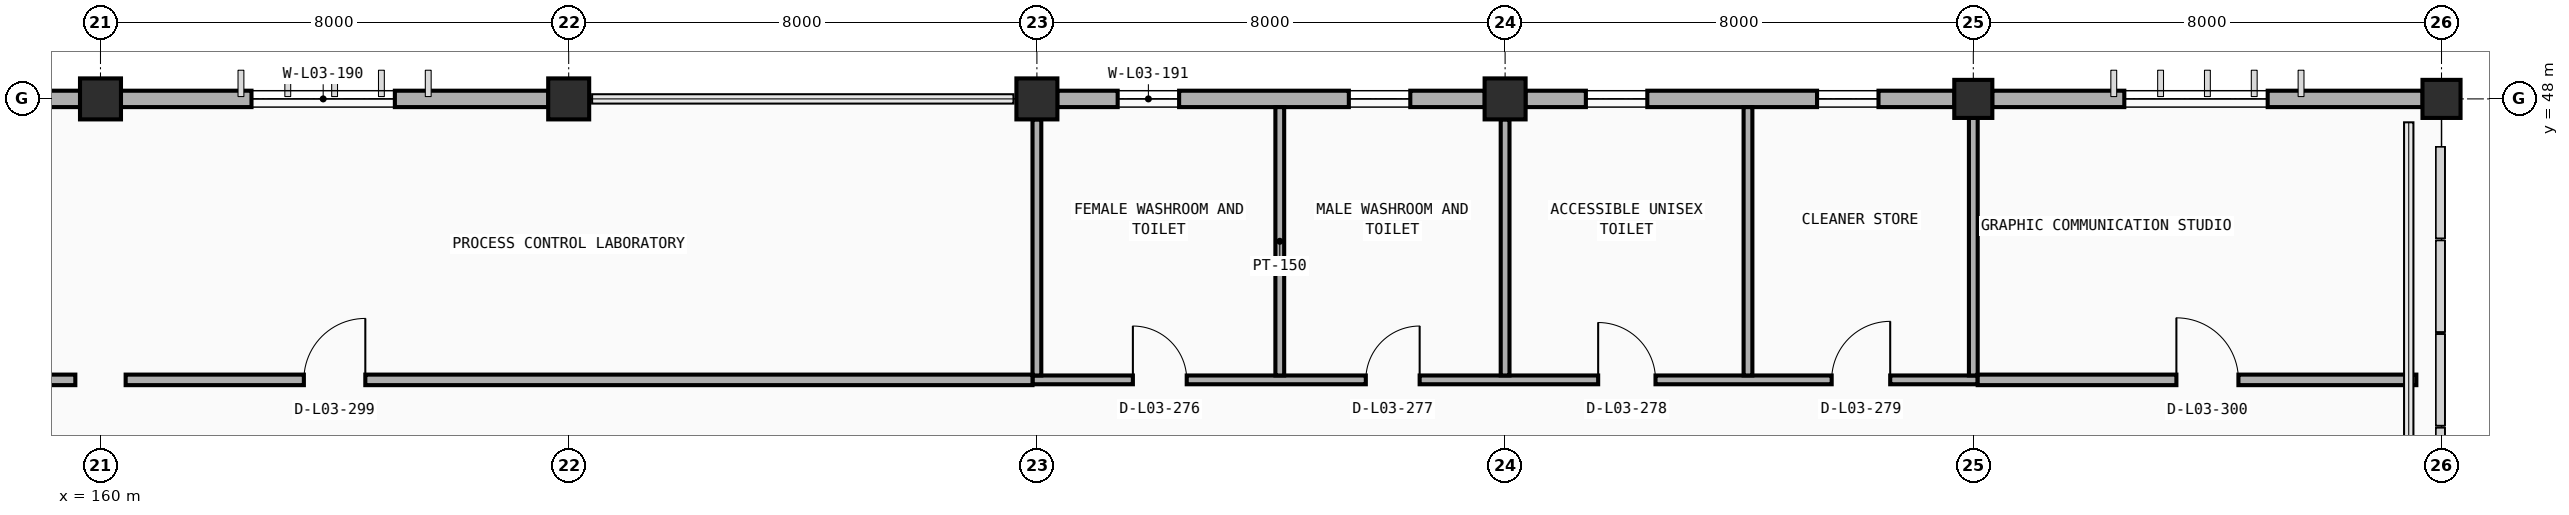
"""IFC4 building model, lengths in metres.
Left out: names, types, materials, properties, quantities, classifications, styles, units other than length and angle.
Written with IfcOpenShell. Run it as: python <this file> out.ifc"""

import sys

from ifc_helpers import new_model, si_unit, direction, frame, frame_2d, origin, origin_2d, place, context, subcontext, project, spatial, rectangle, extrude, element, fill, save


model = new_model("IFC4")
c1 = context("Model", 3, precision=1e-05, world=origin(), true_north=direction((0.0, 1.0)))
c2 = subcontext(c1, "Body", "Model", "MODEL_VIEW")
j1 = project(units=[si_unit("LENGTHUNIT", "METRE"), si_unit("PLANEANGLEUNIT", "RADIAN")], contexts=[c1])
p1 = place(None, origin())
s1 = spatial("IfcSite", under=j1, at=p1, CompositionType="ELEMENT")
p2 = place(p1, origin())
s2 = spatial("IfcBuilding", under=s1, at=p2, CompositionType="ELEMENT")
p3 = place(p2, frame((0.0, 0.0, 9.6)))
s3 = spatial("IfcBuildingStorey", under=s2, at=p3, CompositionType="ELEMENT", Elevation=9.6)
for number, where, z_axis, x_axis in (
    (1, (160.0, 48.0, 0.0), (0.0, 0.0, 1.0), (1.0, 0.0, 0.0)),
    (2, (168.0, 48.0, 0.0), (0.0, 0.0, 1.0), (1.0, 0.0, 0.0)),
    (3, (176.0, 48.0, 0.0), (0.0, 0.0, 1.0), (1.0, 0.0, 0.0)),
    (4, (184.0, 48.0, 0.0), (0.0, 0.0, 1.0), (1.0, 0.0, 0.0)),
):
    element("IfcColumn", number, at=place(p3, frame(where, z_axis=z_axis, x_axis=x_axis)), inside=s3, PredefinedType="COLUMN", context=c2, shape_type="SweptSolid", body=[
        extrude(rectangle(XDim=0.7, YDim=0.7, at=origin_2d()), origin(), (0.0, 0.0, 1.0), 4.2),
    ])
for number, where, z_axis, x_axis in (
    (5, (192.0, 48.0, 0.0), (0.0, 0.0, 1.0), (1.0, 0.0, 0.0)),
    (6, (200.0, 48.0, 0.0), (0.0, 0.0, 1.0), (1.0, 0.0, 0.0)),
):
    element("IfcColumn", number, at=place(p3, frame(where, z_axis=z_axis, x_axis=x_axis)), inside=s3, PredefinedType="COLUMN", context=c2, shape_type="SweptSolid", body=[
        extrude(rectangle(XDim=0.65, YDim=0.65, at=origin_2d()), origin(), (0.0, 0.0, 1.0), 4.2),
    ])
p4 = place(p3, frame((152.347, 48.0, 0.0), z_axis=(0.0, 0.0, 1.0), x_axis=(1.0, 0.0, 0.0)))
e7 = element("IfcWall", 7, at=p4, inside=s3, PredefinedType="STANDARD", context=c2, shape_type="SweptSolid", body=[
    extrude(rectangle(XDim=7.306, YDim=0.28, at=frame_2d((3.653, 0.0))), origin(), (0.0, 0.0, 1.0), 3.325),
])
p5 = place(p4, frame((2.233, 0.0, 0.9)))
e8 = element("IfcOpeningElement", 8, at=p5, cuts=e7, PredefinedType="OPENING", context=c2, shape_type="SweptSolid", body=[
    extrude(rectangle(XDim=1.05, YDim=1.85, at=frame_2d((0.525, 0.925))), frame((0.0, 0.15, 0.0), z_axis=(0.0, -1.0, 0.0), x_axis=(1.0, 0.0, 0.0)), (0.0, 0.0, 1.0), 0.3),
])
p6 = place(p3, frame((160.347, 48.0, 0.0), z_axis=(0.0, 0.0, 1.0), x_axis=(1.0, 0.0, 0.0)))
e9 = element("IfcWall", 9, at=p6, inside=s3, PredefinedType="STANDARD", context=c2, shape_type="SweptSolid", body=[
    extrude(rectangle(XDim=7.306, YDim=0.28, at=frame_2d((3.653, 0.0))), origin(), (0.0, 0.0, 1.0), 3.325),
])
p7 = place(p6, frame((2.233, 0.0, 0.9)))
e10 = element("IfcOpeningElement", 10, at=p7, cuts=e9, PredefinedType="OPENING", context=c2, shape_type="SweptSolid", body=[
    extrude(rectangle(XDim=2.45, YDim=1.7, at=frame_2d((1.225, 0.85))), frame((0.0, 0.15, 0.0), z_axis=(0.0, -1.0, 0.0), x_axis=(1.0, 0.0, 0.0)), (0.0, 0.0, 1.0), 0.3),
])
p8 = place(p3, frame((176.347, 48.0, 0.0), z_axis=(0.0, 0.0, 1.0), x_axis=(1.0, 0.0, 0.0)))
e11 = element("IfcWall", 11, at=p8, inside=s3, PredefinedType="STANDARD", context=c2, shape_type="SweptSolid", body=[
    extrude(rectangle(XDim=7.306, YDim=0.28, at=frame_2d((3.653, 0.0))), origin(), (0.0, 0.0, 1.0), 3.325),
])
p9 = place(p8, frame((1.033, 0.0, 1.15)))
e12 = element("IfcOpeningElement", 12, at=p9, cuts=e11, PredefinedType="OPENING", context=c2, shape_type="SweptSolid", body=[
    extrude(rectangle(XDim=1.05, YDim=1.25, at=frame_2d((0.525, 0.625))), frame((0.0, 0.15, 0.0), z_axis=(0.0, -1.0, 0.0), x_axis=(1.0, 0.0, 0.0)), (0.0, 0.0, 1.0), 0.3),
])
p10 = place(p8, frame((4.983, 0.0, 1.15)))
e13 = element("IfcOpeningElement", 13, at=p10, cuts=e11, PredefinedType="OPENING", context=c2, shape_type="SweptSolid", body=[
    extrude(rectangle(XDim=1.05, YDim=1.25, at=frame_2d((0.525, 0.625))), frame((0.0, 0.15, 0.0), z_axis=(0.0, -1.0, 0.0), x_axis=(1.0, 0.0, 0.0)), (0.0, 0.0, 1.0), 0.3),
])
p11 = place(p3, frame((184.347, 48.0, 0.0), z_axis=(0.0, 0.0, 1.0), x_axis=(1.0, 0.0, 0.0)))
e14 = element("IfcWall", 14, at=p11, inside=s3, PredefinedType="STANDARD", context=c2, shape_type="SweptSolid", body=[
    extrude(rectangle(XDim=7.331, YDim=0.28, at=frame_2d((3.666, 0.0))), origin(), (0.0, 0.0, 1.0), 3.325),
])
p12 = place(p11, frame((1.033, 0.0, 1.15)))
e15 = element("IfcOpeningElement", 15, at=p12, cuts=e14, PredefinedType="OPENING", context=c2, shape_type="SweptSolid", body=[
    extrude(rectangle(XDim=1.05, YDim=1.25, at=frame_2d((0.525, 0.625))), frame((0.0, 0.15, 0.0), z_axis=(0.0, -1.0, 0.0), x_axis=(1.0, 0.0, 0.0)), (0.0, 0.0, 1.0), 0.3),
])
p13 = place(p11, frame((4.983, 0.0, 1.15)))
e16 = element("IfcOpeningElement", 16, at=p13, cuts=e14, PredefinedType="OPENING", context=c2, shape_type="SweptSolid", body=[
    extrude(rectangle(XDim=1.05, YDim=1.25, at=frame_2d((0.525, 0.625))), frame((0.0, 0.15, 0.0), z_axis=(0.0, -1.0, 0.0), x_axis=(1.0, 0.0, 0.0)), (0.0, 0.0, 1.0), 0.3),
])
p14 = place(p3, frame((192.322, 48.0, 0.0), z_axis=(0.0, 0.0, 1.0), x_axis=(1.0, 0.0, 0.0)))
e17 = element("IfcWall", 17, at=p14, inside=s3, PredefinedType="STANDARD", context=c2, shape_type="SweptSolid", body=[
    extrude(rectangle(XDim=7.356, YDim=0.28, at=frame_2d((3.678, 0.0))), origin(), (0.0, 0.0, 1.0), 3.325),
])
p15 = place(p14, frame((2.258, 0.0, 0.9)))
e18 = element("IfcOpeningElement", 18, at=p15, cuts=e17, PredefinedType="OPENING", context=c2, shape_type="SweptSolid", body=[
    extrude(rectangle(XDim=2.45, YDim=1.7, at=frame_2d((1.225, 0.85))), frame((0.0, 0.15, 0.0), z_axis=(0.0, -1.0, 0.0), x_axis=(1.0, 0.0, 0.0)), (0.0, 0.0, 1.0), 0.3),
])
p16 = place(p3, frame((199.76, 47.78, 0.0), z_axis=(0.0, 0.0, 1.0), x_axis=(-1.0, 0.0, 0.0)))
e19 = element("IfcWall", 19, at=p16, inside=s3, PredefinedType="PARAPET", context=c2, shape_type="SweptSolid", body=[
    extrude(rectangle(XDim=0.32, YDim=0.2, at=frame_2d((0.16, 0.0))), origin(), (0.0, 0.0, 1.0), 3.35),
])
p17 = place(p3, frame((175.925, 43.2, 0.0), z_axis=(0.0, 0.0, 1.0), x_axis=(1.0, 0.0, 0.0)))
e20 = element("IfcWall", 20, at=p17, inside=s3, PredefinedType="PARTITIONING", context=c2, shape_type="SweptSolid", body=[
    extrude(rectangle(XDim=16.15, YDim=0.15, at=frame_2d((8.075, 0.0))), origin(), (0.0, 0.0, 1.0), 3.3),
])
p18 = place(p17, frame((1.715, 0.0, 0.0)))
e21 = element("IfcOpeningElement", 21, at=p18, cuts=e20, PredefinedType="OPENING", context=c2, shape_type="SweptSolid", body=[
    extrude(rectangle(XDim=0.92, YDim=2.12, at=frame_2d((0.46, 1.06))), frame((0.0, 0.085, 0.0), z_axis=(0.0, -1.0, 0.0), x_axis=(1.0, 0.0, 0.0)), (0.0, 0.0, 1.0), 0.17),
])
p19 = place(p17, frame((5.695, 0.0, 0.0)))
e22 = element("IfcOpeningElement", 22, at=p19, cuts=e20, PredefinedType="OPENING", context=c2, shape_type="SweptSolid", body=[
    extrude(rectangle(XDim=0.92, YDim=2.12, at=frame_2d((0.46, 1.06))), frame((0.0, 0.085, 0.0), z_axis=(0.0, -1.0, 0.0), x_axis=(1.0, 0.0, 0.0)), (0.0, 0.0, 1.0), 0.17),
])
p20 = place(p17, frame((9.665, 0.0, 0.0)))
e23 = element("IfcOpeningElement", 23, at=p20, cuts=e20, PredefinedType="OPENING", context=c2, shape_type="SweptSolid", body=[
    extrude(rectangle(XDim=0.98, YDim=2.12, at=frame_2d((0.49, 1.06))), frame((0.0, 0.085, 0.0), z_axis=(0.0, -1.0, 0.0), x_axis=(1.0, 0.0, 0.0)), (0.0, 0.0, 1.0), 0.17),
])
p21 = place(p17, frame((13.655, 0.0, 0.0)))
e24 = element("IfcOpeningElement", 24, at=p21, cuts=e20, PredefinedType="OPENING", context=c2, shape_type="SweptSolid", body=[
    extrude(rectangle(XDim=1.0, YDim=2.15, at=frame_2d((0.5, 1.075))), frame((0.0, 0.085, 0.0), z_axis=(0.0, -1.0, 0.0), x_axis=(1.0, 0.0, 0.0)), (0.0, 0.0, 1.0), 0.17),
])
p22 = place(p3, frame((176.0, 43.275, 0.0), z_axis=(0.0, 0.0, 1.0), x_axis=(0.0, 1.0, 0.0)))
e25 = element("IfcWall", 25, at=p22, inside=s3, PredefinedType="PARTITIONING", context=c2, shape_type="SweptSolid", body=[
    extrude(rectangle(XDim=4.375, YDim=0.15, at=frame_2d((2.188, 0.0))), origin(), (0.0, 0.0, 1.0), 3.225),
])
p23 = place(p3, frame((180.15, 43.275, 0.0), z_axis=(0.0, 0.0, 1.0), x_axis=(0.0, 1.0, 0.0)))
e26 = element("IfcWall", 26, at=p23, inside=s3, PredefinedType="PARTITIONING", context=c2, shape_type="SweptSolid", body=[
    extrude(rectangle(XDim=4.585, YDim=0.15, at=frame_2d((2.292, 0.0))), origin(), (0.0, 0.0, 1.0), 3.3),
])
p24 = place(p3, frame((184.0, 43.275, 0.0), z_axis=(0.0, 0.0, 1.0), x_axis=(0.0, 1.0, 0.0)))
e27 = element("IfcWall", 27, at=p24, inside=s3, PredefinedType="PARTITIONING", context=c2, shape_type="SweptSolid", body=[
    extrude(rectangle(XDim=4.375, YDim=0.15, at=frame_2d((2.188, 0.0))), origin(), (0.0, 0.0, 1.0), 3.225),
])
p25 = place(p3, frame((188.15, 43.275, 0.0), z_axis=(0.0, 0.0, 1.0), x_axis=(0.0, 1.0, 0.0)))
e28 = element("IfcWall", 28, at=p25, inside=s3, PredefinedType="PARTITIONING", context=c2, shape_type="SweptSolid", body=[
    extrude(rectangle(XDim=4.585, YDim=0.15, at=frame_2d((2.292, 0.0))), origin(), (0.0, 0.0, 1.0), 3.3),
])
p26 = place(p3, frame((192.0, 43.275, 0.0), z_axis=(0.0, 0.0, 1.0), x_axis=(0.0, 1.0, 0.0)))
e29 = element("IfcWall", 29, at=p26, inside=s3, PredefinedType="PARTITIONING", context=c2, shape_type="SweptSolid", body=[
    extrude(rectangle(XDim=4.4, YDim=0.15, at=frame_2d((2.2, 0.0))), origin(), (0.0, 0.0, 1.0), 3.225),
])
p27 = place(p3, frame((128.43, 43.2, 0.0), z_axis=(0.0, 0.0, 1.0), x_axis=(1.0, 0.0, 0.0)))
e30 = element("IfcWall", 30, at=p27, inside=s3, PredefinedType="PARTITIONING", context=c2, shape_type="SweptSolid", body=[
    extrude(rectangle(XDim=31.14, YDim=0.18, at=frame_2d((15.57, 0.0))), origin(), (0.0, 0.0, 1.0), 3.3),
])
p28 = place(p27, frame((3.08, 0.0, 0.0)))
e31 = element("IfcOpeningElement", 31, at=p28, cuts=e30, PredefinedType="OPENING", context=c2, shape_type="SweptSolid", body=[
    extrude(rectangle(XDim=0.98, YDim=2.1, at=frame_2d((0.49, 1.05))), frame((0.0, 0.1, 0.0), z_axis=(0.0, -1.0, 0.0), x_axis=(1.0, 0.0, 0.0)), (0.0, 0.0, 1.0), 0.2),
])
p29 = place(p3, frame((160.43, 43.2, 0.0), z_axis=(0.0, 0.0, 1.0), x_axis=(1.0, 0.0, 0.0)))
e32 = element("IfcWall", 32, at=p29, inside=s3, PredefinedType="PARTITIONING", context=c2, shape_type="SweptSolid", body=[
    extrude(rectangle(XDim=15.495, YDim=0.18, at=frame_2d((7.748, 0.0))), origin(), (0.0, 0.0, 1.0), 3.3),
])
p30 = place(p29, frame((3.045, 0.0, 0.0)))
e33 = element("IfcOpeningElement", 33, at=p30, cuts=e32, PredefinedType="OPENING", context=c2, shape_type="SweptSolid", body=[
    extrude(rectangle(XDim=1.05, YDim=2.15, at=frame_2d((0.525, 1.075))), frame((0.0, 0.1, 0.0), z_axis=(0.0, -1.0, 0.0), x_axis=(1.0, 0.0, 0.0)), (0.0, 0.0, 1.0), 0.2),
])
p31 = place(p3, frame((192.075, 43.2, 0.0), z_axis=(0.0, 0.0, 1.0), x_axis=(1.0, 0.0, 0.0)))
e34 = element("IfcWall", 34, at=p31, inside=s3, PredefinedType="PARTITIONING", context=c2, shape_type="SweptSolid", body=[
    extrude(rectangle(XDim=7.495, YDim=0.18, at=frame_2d((3.748, 0.0))), origin(), (0.0, 0.0, 1.0), 3.3),
])
p32 = place(p31, frame((3.395, 0.0, 0.0)))
e35 = element("IfcOpeningElement", 35, at=p32, cuts=e34, PredefinedType="OPENING", context=c2, shape_type="SweptSolid", body=[
    extrude(rectangle(XDim=1.06, YDim=2.1, at=frame_2d((0.53, 1.05))), frame((0.0, 0.1, 0.0), z_axis=(0.0, -1.0, 0.0), x_axis=(1.0, 0.0, 0.0)), (0.0, 0.0, 1.0), 0.2),
])
p33 = place(p7, origin())
e36 = element("IfcWindow", 36, at=p33, inside=s3, PartitioningType="DOUBLE_PANEL_VERTICAL", PredefinedType="WINDOW", context=c2, shape_type="SweptSolid", body=[
    extrude(rectangle(XDim=2.45, YDim=1.7, at=frame_2d((1.225, 0.85))), frame((0.0, 0.03, 0.0), z_axis=(0.0, -1.0, 0.0), x_axis=(1.0, 0.0, 0.0)), (0.0, 0.0, 1.0), 0.06),
])
fill(e10, e36)
p34 = place(p9, origin())
e37 = element("IfcWindow", 37, at=p34, inside=s3, PartitioningType="SINGLE_PANEL", PredefinedType="WINDOW", context=c2, shape_type="SweptSolid", body=[
    extrude(rectangle(XDim=1.05, YDim=1.25, at=frame_2d((0.525, 0.625))), frame((0.0, 0.03, 0.0), z_axis=(0.0, -1.0, 0.0), x_axis=(1.0, 0.0, 0.0)), (0.0, 0.0, 1.0), 0.06),
])
fill(e12, e37)
p35 = place(p10, origin())
e38 = element("IfcWindow", 38, at=p35, inside=s3, PartitioningType="SINGLE_PANEL", PredefinedType="WINDOW", context=c2, shape_type="SweptSolid", body=[
    extrude(rectangle(XDim=1.05, YDim=1.25, at=frame_2d((0.525, 0.625))), frame((0.0, 0.03, 0.0), z_axis=(0.0, -1.0, 0.0), x_axis=(1.0, 0.0, 0.0)), (0.0, 0.0, 1.0), 0.06),
])
fill(e13, e38)
p36 = place(p12, origin())
e39 = element("IfcWindow", 39, at=p36, inside=s3, PartitioningType="SINGLE_PANEL", PredefinedType="WINDOW", context=c2, shape_type="SweptSolid", body=[
    extrude(rectangle(XDim=1.05, YDim=1.25, at=frame_2d((0.525, 0.625))), frame((0.0, 0.03, 0.0), z_axis=(0.0, -1.0, 0.0), x_axis=(1.0, 0.0, 0.0)), (0.0, 0.0, 1.0), 0.06),
])
fill(e15, e39)
p37 = place(p13, origin())
e40 = element("IfcWindow", 40, at=p37, inside=s3, PartitioningType="SINGLE_PANEL", PredefinedType="WINDOW", context=c2, shape_type="SweptSolid", body=[
    extrude(rectangle(XDim=1.05, YDim=1.25, at=frame_2d((0.525, 0.625))), frame((0.0, 0.03, 0.0), z_axis=(0.0, -1.0, 0.0), x_axis=(1.0, 0.0, 0.0)), (0.0, 0.0, 1.0), 0.06),
])
fill(e16, e40)
p38 = place(p15, origin())
e41 = element("IfcWindow", 41, at=p38, inside=s3, PartitioningType="DOUBLE_PANEL_VERTICAL", PredefinedType="WINDOW", context=c2, shape_type="SweptSolid", body=[
    extrude(rectangle(XDim=2.45, YDim=1.7, at=frame_2d((1.225, 0.85))), frame((0.0, 0.03, 0.0), z_axis=(0.0, -1.0, 0.0), x_axis=(1.0, 0.0, 0.0)), (0.0, 0.0, 1.0), 0.06),
])
fill(e18, e41)
p39 = place(p18, origin())
e42 = element("IfcDoor", 42, at=p39, inside=s3, OperationType="SINGLE_SWING_LEFT", PredefinedType="DOOR", context=c2, shape_type="SweptSolid", body=[
    extrude(rectangle(XDim=0.92, YDim=2.12, at=frame_2d((0.46, 1.06))), frame((0.0, 0.025, 0.0), z_axis=(0.0, -1.0, 0.0), x_axis=(1.0, 0.0, 0.0)), (0.0, 0.0, 1.0), 0.05),
])
fill(e21, e42)
p40 = place(p19, origin())
e43 = element("IfcDoor", 43, at=p40, inside=s3, OperationType="SINGLE_SWING_RIGHT", PredefinedType="DOOR", context=c2, shape_type="SweptSolid", body=[
    extrude(rectangle(XDim=0.92, YDim=2.12, at=frame_2d((0.46, 1.06))), frame((0.0, 0.025, 0.0), z_axis=(0.0, -1.0, 0.0), x_axis=(1.0, 0.0, 0.0)), (0.0, 0.0, 1.0), 0.05),
])
fill(e22, e43)
p41 = place(p20, origin())
e44 = element("IfcDoor", 44, at=p41, inside=s3, OperationType="SINGLE_SWING_LEFT", PredefinedType="DOOR", context=c2, shape_type="SweptSolid", body=[
    extrude(rectangle(XDim=0.98, YDim=2.12, at=frame_2d((0.49, 1.06))), frame((0.0, 0.025, 0.0), z_axis=(0.0, -1.0, 0.0), x_axis=(1.0, 0.0, 0.0)), (0.0, 0.0, 1.0), 0.05),
])
fill(e23, e44)
p42 = place(p21, origin())
e45 = element("IfcDoor", 45, at=p42, inside=s3, OperationType="SINGLE_SWING_RIGHT", PredefinedType="DOOR", context=c2, shape_type="SweptSolid", body=[
    extrude(rectangle(XDim=1.0, YDim=2.15, at=frame_2d((0.5, 1.075))), frame((0.0, 0.025, 0.0), z_axis=(0.0, -1.0, 0.0), x_axis=(1.0, 0.0, 0.0)), (0.0, 0.0, 1.0), 0.05),
])
fill(e24, e45)
p43 = place(p30, origin())
e46 = element("IfcDoor", 46, at=p43, inside=s3, OperationType="SINGLE_SWING_RIGHT", PredefinedType="DOOR", context=c2, shape_type="SweptSolid", body=[
    extrude(rectangle(XDim=1.05, YDim=2.15, at=frame_2d((0.525, 1.075))), frame((0.0, 0.025, 0.0), z_axis=(0.0, -1.0, 0.0), x_axis=(1.0, 0.0, 0.0)), (0.0, 0.0, 1.0), 0.05),
])
fill(e33, e46)
p44 = place(p32, origin())
e47 = element("IfcDoor", 47, at=p44, inside=s3, OperationType="SINGLE_SWING_LEFT", PredefinedType="DOOR", context=c2, shape_type="SweptSolid", body=[
    extrude(rectangle(XDim=1.06, YDim=2.1, at=frame_2d((0.53, 1.05))), frame((0.0, 0.025, 0.0), z_axis=(0.0, -1.0, 0.0), x_axis=(1.0, 0.0, 0.0)), (0.0, 0.0, 1.0), 0.05),
])
fill(e35, e47)
save(model, sys.argv[1])
